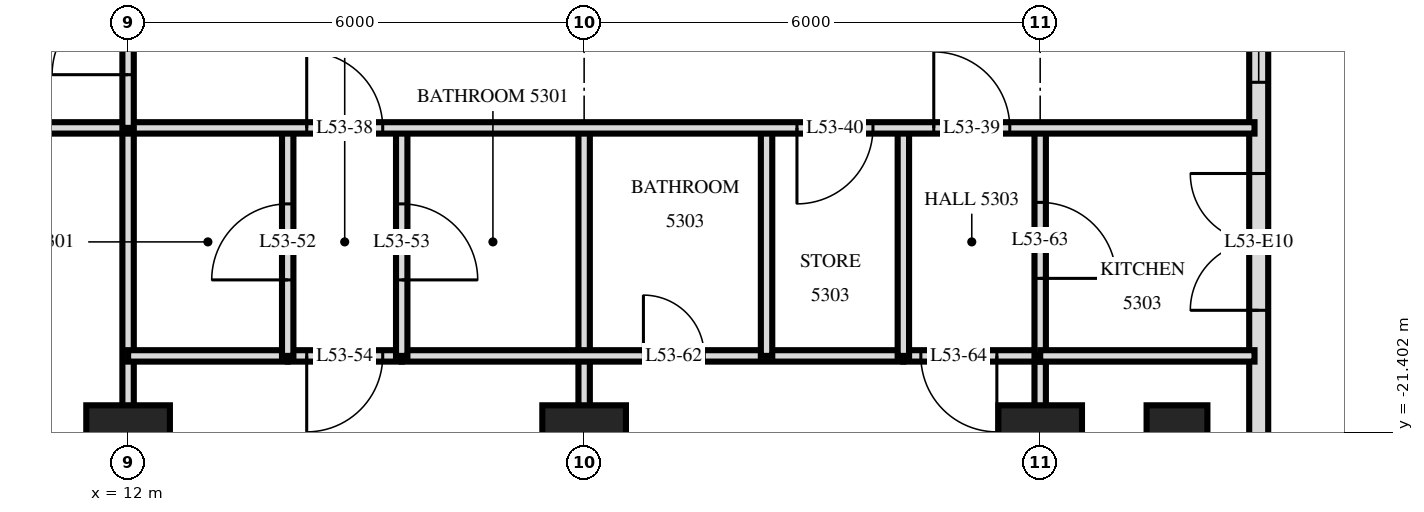
"""IFC4 building model, lengths in metres.
Left out: names, types, materials, properties, quantities, classifications, styles, units other than length and angle.
Written with IfcOpenShell. Run it as: python <this file> out.ifc"""

import sys

from ifc_helpers import new_model, si_unit, direction, frame, frame_2d, origin, origin_2d, place, context, subcontext, project, spatial, rectangle, extrude, element, fill, save


model = new_model("IFC4")
c1 = context("Model", 3, precision=1e-05, world=origin(), true_north=direction((0.0, 1.0)))
c2 = subcontext(c1, "Body", "Model", "MODEL_VIEW")
j1 = project(units=[si_unit("LENGTHUNIT", "METRE"), si_unit("PLANEANGLEUNIT", "RADIAN")], contexts=[c1])
p1 = place(None, origin())
s1 = spatial("IfcSite", under=j1, at=p1, CompositionType="ELEMENT")
p2 = place(p1, origin())
s2 = spatial("IfcBuilding", under=s1, at=p2, CompositionType="ELEMENT")
p3 = place(p2, frame((0.0, 0.0, 204.6)))
s3 = spatial("IfcBuildingStorey", under=s2, at=p3, CompositionType="ELEMENT", Elevation=204.6)
for number, where, z_axis, x_axis in (
    (1, (12.0, -21.6, 0.0), (0.0, 0.0, 1.0), (1.0, 0.0, 0.0)),
    (2, (18.0, -21.6, 0.0), (0.0, 0.0, 1.0), (1.0, 0.0, 0.0)),
    (3, (24.0, -21.6, 0.0), (0.0, 0.0, 1.0), (1.0, 0.0, 0.0)),
):
    element("IfcColumn", number, at=place(p3, frame(where, z_axis=z_axis, x_axis=x_axis)), inside=s3, PredefinedType="COLUMN", context=c2, shape_type="SweptSolid", body=[
        extrude(rectangle(XDim=1.1, YDim=1.1, at=origin_2d()), origin(), (0.0, 0.0, 1.0), 3.5),
    ])
p4 = place(p3, frame((25.8, -21.6, 0.0), z_axis=(0.0, 0.0, 1.0), x_axis=(0.0, 1.0, 0.0)))
e4 = element("IfcColumn", 4, at=p4, inside=s3, PredefinedType="COLUMN", context=c2, shape_type="SweptSolid", body=[
    extrude(rectangle(XDim=1.1, YDim=0.8, at=origin_2d()), origin(), (0.0, 0.0, 1.0), 3.5),
])
p5 = place(p3, frame((26.875, -24.875, 0.0), z_axis=(0.0, 0.0, 1.0), x_axis=(0.0, 1.0, 0.0)))
e5 = element("IfcWall", 5, at=p5, inside=s3, PredefinedType="SOLIDWALL", context=c2, shape_type="SweptSolid", body=[
    extrude(rectangle(XDim=21.551, YDim=0.25, at=frame_2d((10.775, 0.0))), origin(), (0.0, 0.0, 1.0), 3.22),
])
p6 = place(p5, frame((0.575, 0.0, 0.0)))
e6 = element("IfcOpeningElement", 6, at=p6, cuts=e5, PredefinedType="OPENING", context=c2, shape_type="SweptSolid", body=[
    extrude(rectangle(XDim=1.8, YDim=2.4, at=frame_2d((0.9, 1.2))), frame((0.0, 0.135, 0.0), z_axis=(0.0, -1.0, 0.0), x_axis=(1.0, 0.0, 0.0)), (0.0, 0.0, 1.0), 0.27),
])
p7 = place(p5, frame((5.075, 0.0, 0.0)))
e7 = element("IfcOpeningElement", 7, at=p7, cuts=e5, PredefinedType="OPENING", context=c2, shape_type="SweptSolid", body=[
    extrude(rectangle(XDim=1.8, YDim=2.4, at=frame_2d((0.9, 1.2))), frame((0.0, 0.135, 0.0), z_axis=(0.0, -1.0, 0.0), x_axis=(1.0, 0.0, 0.0)), (0.0, 0.0, 1.0), 0.27),
])
p8 = place(p5, frame((8.075, 0.0, 0.9)))
e8 = element("IfcOpeningElement", 8, at=p8, cuts=e5, PredefinedType="OPENING", context=c2, shape_type="SweptSolid", body=[
    extrude(rectangle(XDim=1.2, YDim=1.5, at=frame_2d((0.6, 0.75))), frame((0.0, 0.135, 0.0), z_axis=(0.0, -1.0, 0.0), x_axis=(1.0, 0.0, 0.0)), (0.0, 0.0, 1.0), 0.27),
])
p9 = place(p5, frame((13.1, 0.0, 0.0)))
e9 = element("IfcOpeningElement", 9, at=p9, cuts=e5, PredefinedType="OPENING", context=c2, shape_type="SweptSolid", body=[
    extrude(rectangle(XDim=1.8, YDim=2.4, at=frame_2d((0.9, 1.2))), frame((0.0, 0.135, 0.0), z_axis=(0.0, -1.0, 0.0), x_axis=(1.0, 0.0, 0.0)), (0.0, 0.0, 1.0), 0.27),
])
p10 = place(p3, frame((24.0, -20.4, 0.0), z_axis=(0.0, 0.0, 1.0), x_axis=(0.0, 1.0, 0.0)))
e10 = element("IfcWall", 10, at=p10, inside=s3, PredefinedType="PARTITIONING", context=c2, shape_type="SweptSolid", body=[
    extrude(rectangle(XDim=3.0, YDim=0.15, at=frame_2d((1.5, 0.0))), origin(), (0.0, 0.0, 1.0), 3.22),
])
p11 = place(p10, frame((1.02, 0.0, 0.0)))
e11 = element("IfcOpeningElement", 11, at=p11, cuts=e10, PredefinedType="OPENING", context=c2, shape_type="SweptSolid", body=[
    extrude(rectangle(XDim=1.0, YDim=2.1, at=frame_2d((0.5, 1.05))), frame((0.0, 0.085, 0.0), z_axis=(0.0, -1.0, 0.0), x_axis=(1.0, 0.0, 0.0)), (0.0, 0.0, 1.0), 0.17),
])
p12 = place(p3, frame((24.0, -28.918, 0.0), z_axis=(0.0, 0.0, 1.0), x_axis=(0.0, 1.0, 0.0)))
e12 = element("IfcWall", 12, at=p12, inside=s3, PredefinedType="PARTITIONING", context=c2, shape_type="SweptSolid", body=[
    extrude(rectangle(XDim=8.518, YDim=0.15, at=frame_2d((4.259, 0.0))), origin(), (0.0, 0.0, 1.0), 3.22),
])
p13 = place(p12, frame((3.698, 0.0, 0.0)))
e13 = element("IfcOpeningElement", 13, at=p13, cuts=e12, PredefinedType="OPENING", context=c2, shape_type="SweptSolid", body=[
    extrude(rectangle(XDim=0.9, YDim=2.1, at=frame_2d((0.45, 1.05))), frame((0.0, 0.085, 0.0), z_axis=(0.0, -1.0, 0.0), x_axis=(1.0, 0.0, 0.0)), (0.0, 0.0, 1.0), 0.17),
])
for number, where, z_axis, x_axis in (
    (14, (22.2, -20.4, 0.0), (0.0, 0.0, 1.0), (0.0, 1.0, 0.0)),
    (15, (20.4, -20.4, 0.0), (0.0, 0.0, 1.0), (0.0, 1.0, 0.0)),
):
    element("IfcWall", number, at=place(p3, frame(where, z_axis=z_axis, x_axis=x_axis)), inside=s3, PredefinedType="PARTITIONING", context=c2, shape_type="SweptSolid", body=[
        extrude(rectangle(XDim=3.0, YDim=0.15, at=frame_2d((1.5, 0.0))), origin(), (0.0, 0.0, 1.0), 3.22),
    ])
p14 = place(p3, frame((18.0, -29.22, 0.0), z_axis=(0.0, 0.0, 1.0), x_axis=(0.0, 1.0, 0.0)))
e16 = element("IfcWall", 16, at=p14, inside=s3, PredefinedType="PARTITIONING", context=c2, shape_type="SweptSolid", body=[
    extrude(rectangle(XDim=11.82, YDim=0.15, at=frame_2d((5.91, 0.0))), origin(), (0.0, 0.0, 1.0), 3.22),
])
p15 = place(p3, frame((15.6, -20.4, 0.0), z_axis=(0.0, 0.0, 1.0), x_axis=(0.0, 1.0, 0.0)))
e17 = element("IfcWall", 17, at=p15, inside=s3, PredefinedType="PARTITIONING", context=c2, shape_type="SweptSolid", body=[
    extrude(rectangle(XDim=3.0, YDim=0.15, at=frame_2d((1.5, 0.0))), origin(), (0.0, 0.0, 1.0), 3.22),
])
p16 = place(p15, frame((1.0, 0.0, 0.0)))
e18 = element("IfcOpeningElement", 18, at=p16, cuts=e17, PredefinedType="OPENING", context=c2, shape_type="SweptSolid", body=[
    extrude(rectangle(XDim=1.0, YDim=2.1, at=frame_2d((0.5, 1.05))), frame((0.0, 0.085, 0.0), z_axis=(0.0, -1.0, 0.0), x_axis=(1.0, 0.0, 0.0)), (0.0, 0.0, 1.0), 0.17),
])
p17 = place(p3, frame((14.1, -20.4, 0.0), z_axis=(0.0, 0.0, 1.0), x_axis=(0.0, 1.0, 0.0)))
e19 = element("IfcWall", 19, at=p17, inside=s3, PredefinedType="PARTITIONING", context=c2, shape_type="SweptSolid", body=[
    extrude(rectangle(XDim=3.0, YDim=0.15, at=frame_2d((1.5, 0.0))), origin(), (0.0, 0.0, 1.0), 3.22),
])
p18 = place(p17, frame((1.0, 0.0, 0.0)))
e20 = element("IfcOpeningElement", 20, at=p18, cuts=e19, PredefinedType="OPENING", context=c2, shape_type="SweptSolid", body=[
    extrude(rectangle(XDim=1.0, YDim=2.1, at=frame_2d((0.5, 1.05))), frame((0.0, 0.085, 0.0), z_axis=(0.0, -1.0, 0.0), x_axis=(1.0, 0.0, 0.0)), (0.0, 0.0, 1.0), 0.17),
])
p19 = place(p3, frame((12.0, -17.4, 0.0), z_axis=(0.0, 0.0, 1.0), x_axis=(0.0, 1.0, 0.0)))
e21 = element("IfcWall", 21, at=p19, inside=s3, PredefinedType="PARTITIONING", context=c2, shape_type="SweptSolid", body=[
    extrude(rectangle(XDim=2.35, YDim=0.15, at=frame_2d((1.175, 0.0))), origin(), (0.0, 0.0, 1.0), 3.22),
])
p20 = place(p19, frame((0.7, 0.0, 0.0)))
e22 = element("IfcOpeningElement", 22, at=p20, cuts=e21, PredefinedType="OPENING", context=c2, shape_type="SweptSolid", body=[
    extrude(rectangle(XDim=1.0, YDim=2.1, at=frame_2d((0.5, 1.05))), frame((0.0, 0.085, 0.0), z_axis=(0.0, -1.0, 0.0), x_axis=(1.0, 0.0, 0.0)), (0.0, 0.0, 1.0), 0.17),
])
p21 = place(p3, frame((12.0, -29.22, 0.0), z_axis=(0.0, 0.0, 1.0), x_axis=(0.0, 1.0, 0.0)))
e23 = element("IfcWall", 23, at=p21, inside=s3, PredefinedType="PARTITIONING", context=c2, shape_type="SweptSolid", body=[
    extrude(rectangle(XDim=11.82, YDim=0.15, at=frame_2d((5.91, 0.0))), origin(), (0.0, 0.0, 1.0), 3.22),
])
p22 = place(p3, frame((14.1, -20.4, 0.0), z_axis=(0.0, 0.0, 1.0), x_axis=(1.0, 0.0, 0.0)))
e24 = element("IfcWall", 24, at=p22, inside=s3, PredefinedType="PARTITIONING", context=c2, shape_type="SweptSolid", body=[
    extrude(rectangle(XDim=1.5, YDim=0.15, at=frame_2d((0.75, 0.0))), origin(), (0.0, 0.0, 1.0), 3.22),
])
p23 = place(p22, frame((0.25, 0.0, 0.0)))
e25 = element("IfcOpeningElement", 25, at=p23, cuts=e24, PredefinedType="OPENING", context=c2, shape_type="SweptSolid", body=[
    extrude(rectangle(XDim=1.0, YDim=2.1, at=frame_2d((0.5, 1.05))), frame((0.0, 0.085, 0.0), z_axis=(0.0, -1.0, 0.0), x_axis=(1.0, 0.0, 0.0)), (0.0, 0.0, 1.0), 0.17),
])
p24 = place(p3, frame((22.2, -20.4, 0.0), z_axis=(0.0, 0.0, 1.0), x_axis=(1.0, 0.0, 0.0)))
e26 = element("IfcWall", 26, at=p24, inside=s3, PredefinedType="PARTITIONING", context=c2, shape_type="SweptSolid", body=[
    extrude(rectangle(XDim=1.8, YDim=0.15, at=frame_2d((0.9, 0.0))), origin(), (0.0, 0.0, 1.0), 3.22),
])
p25 = place(p24, frame((0.23, 0.0, 0.0)))
e27 = element("IfcOpeningElement", 27, at=p25, cuts=e26, PredefinedType="OPENING", context=c2, shape_type="SweptSolid", body=[
    extrude(rectangle(XDim=1.0, YDim=2.1, at=frame_2d((0.5, 1.05))), frame((0.0, 0.085, 0.0), z_axis=(0.0, -1.0, 0.0), x_axis=(1.0, 0.0, 0.0)), (0.0, 0.0, 1.0), 0.17),
])
p26 = place(p3, frame((12.0, -20.4, 0.0), z_axis=(0.0, 0.0, 1.0), x_axis=(1.0, 0.0, 0.0)))
e28 = element("IfcWall", 28, at=p26, inside=s3, PredefinedType="PARTITIONING", context=c2, shape_type="SweptSolid", body=[
    extrude(rectangle(XDim=2.1, YDim=0.15, at=frame_2d((1.05, 0.0))), origin(), (0.0, 0.0, 1.0), 3.22),
])
p27 = place(p3, frame((15.6, -20.4, 0.0), z_axis=(0.0, 0.0, 1.0), x_axis=(1.0, 0.0, 0.0)))
e29 = element("IfcWall", 29, at=p27, inside=s3, PredefinedType="PARTITIONING", context=c2, shape_type="SweptSolid", body=[
    extrude(rectangle(XDim=6.6, YDim=0.15, at=frame_2d((3.3, 0.0))), origin(), (0.0, 0.0, 1.0), 3.22),
])
p28 = place(p27, frame((3.18, 0.0, 0.0)))
e30 = element("IfcOpeningElement", 30, at=p28, cuts=e29, PredefinedType="OPENING", context=c2, shape_type="SweptSolid", body=[
    extrude(rectangle(XDim=0.8, YDim=2.1, at=frame_2d((0.4, 1.05))), frame((0.0, 0.085, 0.0), z_axis=(0.0, -1.0, 0.0), x_axis=(1.0, 0.0, 0.0)), (0.0, 0.0, 1.0), 0.17),
])
p29 = place(p3, frame((24.0, -20.4, 0.0), z_axis=(0.0, 0.0, 1.0), x_axis=(1.0, 0.0, 0.0)))
e31 = element("IfcWall", 31, at=p29, inside=s3, PredefinedType="PARTITIONING", context=c2, shape_type="SweptSolid", body=[
    extrude(rectangle(XDim=2.82, YDim=0.15, at=frame_2d((1.41, 0.0))), origin(), (0.0, 0.0, 1.0), 3.22),
])
p30 = place(p3, frame((-26.82, -17.4, 0.0), z_axis=(0.0, 0.0, 1.0), x_axis=(1.0, 0.0, 0.0)))
e32 = element("IfcWall", 32, at=p30, inside=s3, PredefinedType="PARTITIONING", context=c2, shape_type="SweptSolid", body=[
    extrude(rectangle(XDim=53.64, YDim=0.15, at=frame_2d((26.82, 0.0))), origin(), (0.0, 0.0, 1.0), 3.22),
])
p31 = place(p30, frame((4.92, 0.0, 0.0)))
e33 = element("IfcOpeningElement", 33, at=p31, cuts=e32, PredefinedType="OPENING", context=c2, shape_type="SweptSolid", body=[
    extrude(rectangle(XDim=1.0, YDim=2.1, at=frame_2d((0.5, 1.05))), frame((0.0, 0.085, 0.0), z_axis=(0.0, -1.0, 0.0), x_axis=(1.0, 0.0, 0.0)), (0.0, 0.0, 1.0), 0.17),
])
p32 = place(p30, frame((1.62, 0.0, 0.0)))
e34 = element("IfcOpeningElement", 34, at=p32, cuts=e32, PredefinedType="OPENING", context=c2, shape_type="SweptSolid", body=[
    extrude(rectangle(XDim=1.0, YDim=2.1, at=frame_2d((0.5, 1.05))), frame((0.0, 0.085, 0.0), z_axis=(0.0, -1.0, 0.0), x_axis=(1.0, 0.0, 0.0)), (0.0, 0.0, 1.0), 0.17),
])
p33 = place(p30, frame((41.17, 0.0, 0.0)))
e35 = element("IfcOpeningElement", 35, at=p33, cuts=e32, PredefinedType="OPENING", context=c2, shape_type="SweptSolid", body=[
    extrude(rectangle(XDim=1.0, YDim=2.1, at=frame_2d((0.5, 1.05))), frame((0.0, 0.085, 0.0), z_axis=(0.0, -1.0, 0.0), x_axis=(1.0, 0.0, 0.0)), (0.0, 0.0, 1.0), 0.17),
])
p34 = place(p30, frame((49.42, 0.0, 0.0)))
e36 = element("IfcOpeningElement", 36, at=p34, cuts=e32, PredefinedType="OPENING", context=c2, shape_type="SweptSolid", body=[
    extrude(rectangle(XDim=1.0, YDim=2.1, at=frame_2d((0.5, 1.05))), frame((0.0, 0.085, 0.0), z_axis=(0.0, -1.0, 0.0), x_axis=(1.0, 0.0, 0.0)), (0.0, 0.0, 1.0), 0.17),
])
p35 = place(p30, frame((47.62, 0.0, 0.0)))
e37 = element("IfcOpeningElement", 37, at=p35, cuts=e32, PredefinedType="OPENING", context=c2, shape_type="SweptSolid", body=[
    extrude(rectangle(XDim=1.0, YDim=2.1, at=frame_2d((0.5, 1.05))), frame((0.0, 0.085, 0.0), z_axis=(0.0, -1.0, 0.0), x_axis=(1.0, 0.0, 0.0)), (0.0, 0.0, 1.0), 0.17),
])
p36 = place(p30, frame((21.82, 0.0, 0.0)))
e38 = element("IfcOpeningElement", 38, at=p36, cuts=e32, PredefinedType="OPENING", context=c2, shape_type="SweptSolid", body=[
    extrude(rectangle(XDim=1.0, YDim=2.1, at=frame_2d((0.5, 1.05))), frame((0.0, 0.085, 0.0), z_axis=(0.0, -1.0, 0.0), x_axis=(1.0, 0.0, 0.0)), (0.0, 0.0, 1.0), 0.17),
])
p37 = place(p30, frame((33.82, 0.0, 0.0)))
e39 = element("IfcOpeningElement", 39, at=p37, cuts=e32, PredefinedType="OPENING", context=c2, shape_type="SweptSolid", body=[
    extrude(rectangle(XDim=1.0, YDim=2.1, at=frame_2d((0.5, 1.05))), frame((0.0, 0.085, 0.0), z_axis=(0.0, -1.0, 0.0), x_axis=(1.0, 0.0, 0.0)), (0.0, 0.0, 1.0), 0.17),
])
p38 = place(p7, origin())
e40 = element("IfcDoor", 40, at=p38, inside=s3, OperationType="DOUBLE_DOOR_SINGLE_SWING", PredefinedType="DOOR", context=c2, shape_type="SweptSolid", body=[
    extrude(rectangle(XDim=1.8, YDim=2.4, at=frame_2d((0.9, 1.2))), frame((0.0, 0.025, 0.0), z_axis=(0.0, -1.0, 0.0), x_axis=(1.0, 0.0, 0.0)), (0.0, 0.0, 1.0), 0.05),
])
fill(e7, e40)
p39 = place(p8, origin())
e41 = element("IfcWindow", 41, at=p39, inside=s3, PartitioningType="SINGLE_PANEL", PredefinedType="WINDOW", context=c2, shape_type="SweptSolid", body=[
    extrude(rectangle(XDim=1.2, YDim=1.5, at=frame_2d((0.6, 0.75))), frame((0.0, 0.03, 0.0), z_axis=(0.0, -1.0, 0.0), x_axis=(1.0, 0.0, 0.0)), (0.0, 0.0, 1.0), 0.06),
])
fill(e8, e41)
p40 = place(p20, origin())
e42 = element("IfcDoor", 42, at=p40, inside=s3, OperationType="SINGLE_SWING_RIGHT", PredefinedType="DOOR", context=c2, shape_type="SweptSolid", body=[
    extrude(rectangle(XDim=1.0, YDim=2.1, at=frame_2d((0.5, 1.05))), frame((0.0, 0.025, 0.0), z_axis=(0.0, -1.0, 0.0), x_axis=(1.0, 0.0, 0.0)), (0.0, 0.0, 1.0), 0.05),
])
fill(e22, e42)
p41 = place(p33, origin())
e43 = element("IfcDoor", 43, at=p41, inside=s3, OperationType="SINGLE_SWING_RIGHT", PredefinedType="DOOR", context=c2, shape_type="SweptSolid", body=[
    extrude(rectangle(XDim=1.0, YDim=2.1, at=frame_2d((0.5, 1.05))), frame((0.0, 0.025, 0.0), z_axis=(0.0, -1.0, 0.0), x_axis=(1.0, 0.0, 0.0)), (0.0, 0.0, 1.0), 0.05),
])
fill(e35, e43)
p42 = place(p34, origin())
e44 = element("IfcDoor", 44, at=p42, inside=s3, OperationType="SINGLE_SWING_RIGHT", PredefinedType="DOOR", context=c2, shape_type="SweptSolid", body=[
    extrude(rectangle(XDim=1.0, YDim=2.1, at=frame_2d((0.5, 1.05))), frame((0.0, 0.025, 0.0), z_axis=(0.0, -1.0, 0.0), x_axis=(1.0, 0.0, 0.0)), (0.0, 0.0, 1.0), 0.05),
])
fill(e36, e44)
p43 = place(p35, frame((0.5, 0.0, 0.0), z_axis=(0.0, 0.0, 1.0), x_axis=(-1.0, 0.0, 0.0)))
e45 = element("IfcDoor", 45, at=p43, inside=s3, OperationType="SINGLE_SWING_LEFT", PredefinedType="DOOR", context=c2, shape_type="SweptSolid", body=[
    extrude(rectangle(XDim=1.0, YDim=2.1, at=frame_2d((0.0, 1.05))), frame((0.0, -0.025, 0.0), z_axis=(0.0, 1.0, 0.0), x_axis=(-1.0, 0.0, 0.0)), (0.0, 0.0, 1.0), 0.05),
])
fill(e37, e45)
p44 = place(p18, origin())
e46 = element("IfcDoor", 46, at=p44, inside=s3, OperationType="SINGLE_SWING_RIGHT", PredefinedType="DOOR", context=c2, shape_type="SweptSolid", body=[
    extrude(rectangle(XDim=1.0, YDim=2.1, at=frame_2d((0.5, 1.05))), frame((0.0, 0.025, 0.0), z_axis=(0.0, -1.0, 0.0), x_axis=(1.0, 0.0, 0.0)), (0.0, 0.0, 1.0), 0.05),
])
fill(e20, e46)
p45 = place(p16, frame((0.5, 0.0, 0.0), z_axis=(0.0, 0.0, 1.0), x_axis=(-1.0, 0.0, 0.0)))
e47 = element("IfcDoor", 47, at=p45, inside=s3, OperationType="SINGLE_SWING_LEFT", PredefinedType="DOOR", context=c2, shape_type="SweptSolid", body=[
    extrude(rectangle(XDim=1.0, YDim=2.1, at=frame_2d((0.0, 1.05))), frame((0.0, -0.025, 0.0), z_axis=(0.0, 1.0, 0.0), x_axis=(-1.0, 0.0, 0.0)), (0.0, 0.0, 1.0), 0.05),
])
fill(e18, e47)
p46 = place(p23, frame((0.5, 0.0, 0.0), z_axis=(0.0, 0.0, 1.0), x_axis=(-1.0, 0.0, 0.0)))
e48 = element("IfcDoor", 48, at=p46, inside=s3, OperationType="SINGLE_SWING_LEFT", PredefinedType="DOOR", context=c2, shape_type="SweptSolid", body=[
    extrude(rectangle(XDim=1.0, YDim=2.1, at=frame_2d((0.0, 1.05))), frame((0.0, -0.025, 0.0), z_axis=(0.0, 1.0, 0.0), x_axis=(-1.0, 0.0, 0.0)), (0.0, 0.0, 1.0), 0.05),
])
fill(e25, e48)
p47 = place(p28, origin())
e49 = element("IfcDoor", 49, at=p47, inside=s3, OperationType="SINGLE_SWING_RIGHT", PredefinedType="DOOR", context=c2, shape_type="SweptSolid", body=[
    extrude(rectangle(XDim=0.8, YDim=2.1, at=frame_2d((0.4, 1.05))), frame((0.0, 0.025, 0.0), z_axis=(0.0, -1.0, 0.0), x_axis=(1.0, 0.0, 0.0)), (0.0, 0.0, 1.0), 0.05),
])
fill(e30, e49)
p48 = place(p11, frame((0.5, 0.0, 0.0), z_axis=(0.0, 0.0, 1.0), x_axis=(-1.0, 0.0, 0.0)))
e50 = element("IfcDoor", 50, at=p48, inside=s3, OperationType="SINGLE_SWING_LEFT", PredefinedType="DOOR", context=c2, shape_type="SweptSolid", body=[
    extrude(rectangle(XDim=1.0, YDim=2.1, at=frame_2d((0.0, 1.05))), frame((0.0, -0.025, 0.0), z_axis=(0.0, 1.0, 0.0), x_axis=(-1.0, 0.0, 0.0)), (0.0, 0.0, 1.0), 0.05),
])
fill(e11, e50)
p49 = place(p25, frame((0.5, 0.0, 0.0), z_axis=(0.0, 0.0, 1.0), x_axis=(-1.0, 0.0, 0.0)))
e51 = element("IfcDoor", 51, at=p49, inside=s3, OperationType="SINGLE_SWING_RIGHT", PredefinedType="DOOR", context=c2, shape_type="SweptSolid", body=[
    extrude(rectangle(XDim=1.0, YDim=2.1, at=frame_2d((0.0, 1.05))), frame((0.0, -0.025, 0.0), z_axis=(0.0, 1.0, 0.0), x_axis=(-1.0, 0.0, 0.0)), (0.0, 0.0, 1.0), 0.05),
])
fill(e27, e51)
save(model, sys.argv[1])
